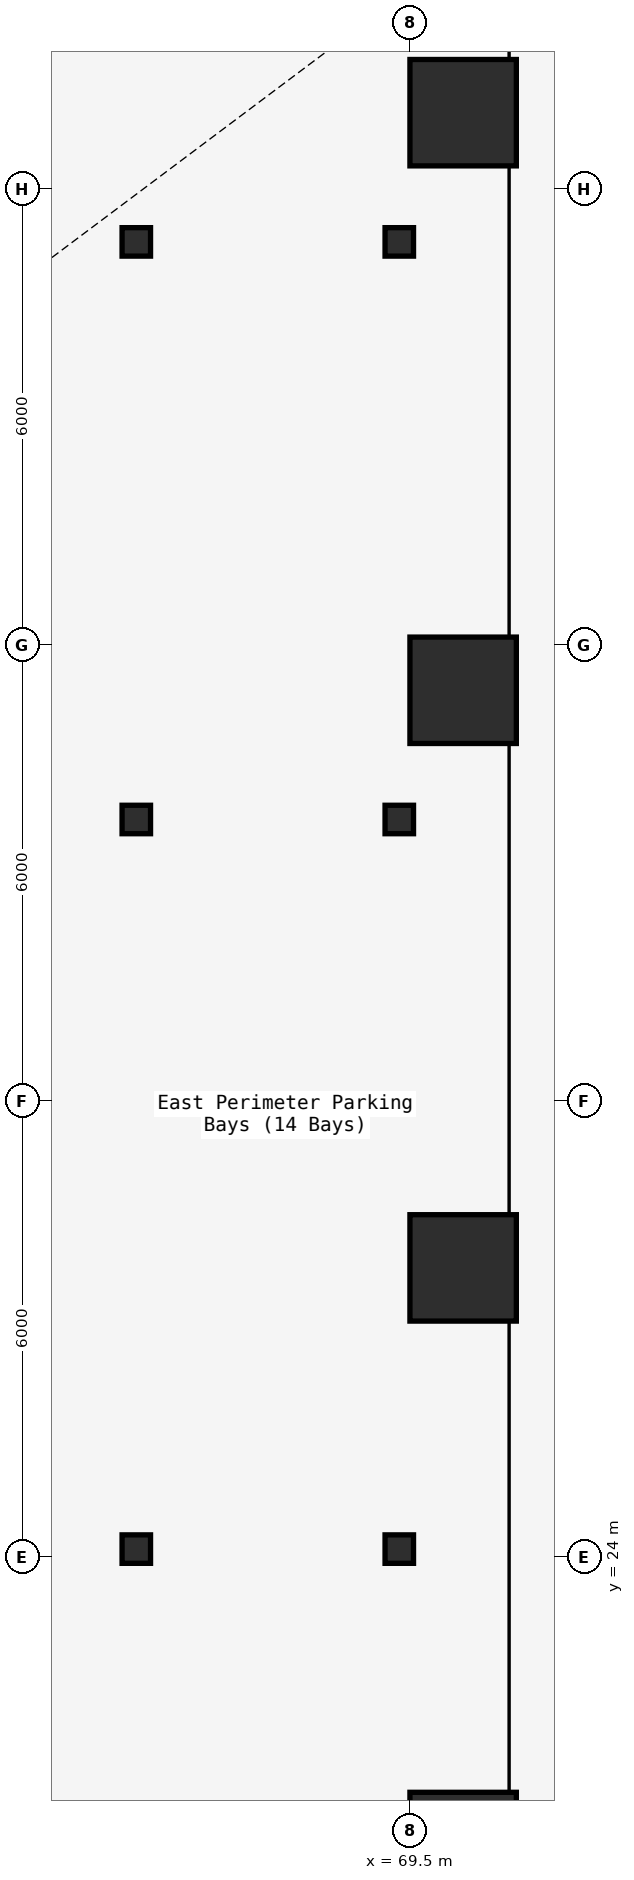
"""IFC4 building model, lengths in metres.
Left out: names, types, materials, properties, quantities, classifications, styles, units other than length and angle.
Written with IfcOpenShell. Run it as: python <this file> out.ifc"""

import sys

from ifc_helpers import new_model, si_unit, direction, frame, origin, origin_2d, place, context, subcontext, project, spatial, rectangle, i_section, extrude, element, save


model = new_model("IFC4")
c1 = context("Model", 3, precision=1e-05, world=origin(), true_north=direction((0.0, 1.0)))
c2 = subcontext(c1, "Body", "Model", "MODEL_VIEW")
j1 = project(units=[si_unit("LENGTHUNIT", "METRE"), si_unit("PLANEANGLEUNIT", "RADIAN")], contexts=[c1])
p1 = place(None, origin())
s1 = spatial("IfcSite", under=j1, at=p1, CompositionType="ELEMENT")
p2 = place(p1, origin())
s2 = spatial("IfcBuilding", under=s1, at=p2, CompositionType="ELEMENT")
p3 = place(p2, frame((0.0, 0.0, -9.0)))
s3 = spatial("IfcBuildingStorey", under=s2, at=p3, CompositionType="ELEMENT", Elevation=-9.0)
for number, where, z_axis, x_axis in (
    (1, (70.2, 20.2, 0.0), (0.0, 0.0, 1.0), (1.0, 0.0, 0.0)),
    (2, (70.2, 27.8, 0.0), (0.0, 0.0, 1.0), (1.0, 0.0, 0.0)),
    (3, (70.2, 35.4, 0.0), (0.0, 0.0, 1.0), (1.0, 0.0, 0.0)),
    (4, (70.2, 43.0, 0.0), (0.0, 0.0, 1.0), (1.0, 0.0, 0.0)),
):
    element("IfcColumn", number, at=place(p3, frame(where, z_axis=z_axis, x_axis=x_axis)), inside=s3, PredefinedType="COLUMN", context=c2, shape_type="SweptSolid", body=[
        extrude(rectangle(XDim=1.4, YDim=1.4, at=origin_2d()), origin(), (0.0, 0.0, 1.0), 4.15),
    ])
for number, where, z_axis, x_axis in (
    (5, (65.9, 24.1, 0.0), (0.0, 0.0, 1.0), (1.0, 0.0, 0.0)),
    (6, (69.36, 24.1, 0.0), (0.0, 0.0, 1.0), (1.0, 0.0, 0.0)),
    (7, (65.9, 33.7, 0.0), (0.0, 0.0, 1.0), (1.0, 0.0, 0.0)),
    (8, (65.9, 41.3, 0.0), (0.0, 0.0, 1.0), (1.0, 0.0, 0.0)),
    (9, (69.36, 33.7, 0.0), (0.0, 0.0, 1.0), (1.0, 0.0, 0.0)),
    (10, (69.36, 41.3, 0.0), (0.0, 0.0, 1.0), (1.0, 0.0, 0.0)),
):
    element("IfcColumn", number, at=place(p3, frame(where, z_axis=z_axis, x_axis=x_axis)), inside=s3, PredefinedType="COLUMN", context=c2, shape_type="SweptSolid", body=[
        extrude(i_section(OverallWidth=0.375, OverallDepth=0.375, WebThickness=0.017, FlangeThickness=0.027, FilletRadius=0.015, at=origin_2d()), origin(), (0.0, 0.0, 1.0), 4.5),
    ])
save(model, sys.argv[1])
